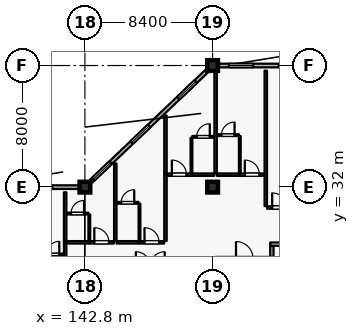
"""IFC4 building model, lengths in metres.
Left out: names, types, materials, properties, quantities, classifications, styles, units other than length and angle.
Written with IfcOpenShell. Run it as: python <this file> out.ifc"""

import sys

from ifc_helpers import new_model, si_unit, direction, frame, frame_2d, origin, origin_2d, place, context, subcontext, project, spatial, rectangle, extrude, element, fill, save


model = new_model("IFC4")
c1 = context("Model", 3, precision=1e-05, world=origin(), true_north=direction((0.0, 1.0)))
c2 = subcontext(c1, "Body", "Model", "MODEL_VIEW")
j1 = project(units=[si_unit("LENGTHUNIT", "METRE"), si_unit("PLANEANGLEUNIT", "RADIAN")], contexts=[c1])
p1 = place(None, origin())
s1 = spatial("IfcSite", under=j1, at=p1, CompositionType="ELEMENT")
p2 = place(p1, origin())
s2 = spatial("IfcBuilding", under=s1, at=p2, CompositionType="ELEMENT")
p3 = place(p2, frame((0.0, 0.0, 28.8)))
s3 = spatial("IfcBuildingStorey", under=s2, at=p3, CompositionType="ELEMENT", Elevation=28.8)
for number, where, z_axis, x_axis in (
    (1, (142.8, 32.0, 0.0), (0.0, 0.0, 1.0), (1.0, 0.0, 0.0)),
    (2, (151.2, 40.0, 0.0), (0.0, 0.0, 1.0), (1.0, 0.0, 0.0)),
    (3, (151.2, 32.0, 0.0), (0.0, 0.0, 1.0), (1.0, 0.0, 0.0)),
):
    element("IfcColumn", number, at=place(p3, frame(where, z_axis=z_axis, x_axis=x_axis)), inside=s3, PredefinedType="COLUMN", context=c2, shape_type="SweptSolid", body=[
        extrude(rectangle(XDim=0.7, YDim=0.7, at=origin_2d()), origin(), (0.0, 0.0, 1.0), 3.6),
    ])
p4 = place(p3, frame((134.75, 32.0, 0.0), z_axis=(0.0, 0.0, 1.0), x_axis=(1.0, 0.0, 0.0)))
e4 = element("IfcWall", 4, at=p4, inside=s3, PredefinedType="SOLIDWALL", context=c2, shape_type="SweptSolid", body=[
    extrude(rectangle(XDim=7.7, YDim=0.24, at=frame_2d((3.85, 0.0))), origin(), (0.0, 0.0, 1.0), 2.93),
])
p5 = place(p4, frame((1.0, 0.0, 0.8)))
e5 = element("IfcOpeningElement", 5, at=p5, cuts=e4, PredefinedType="OPENING", context=c2, shape_type="SweptSolid", body=[
    extrude(rectangle(XDim=1.6, YDim=1.6, at=frame_2d((0.8, 0.8))), frame((0.0, 0.13, 0.0), z_axis=(0.0, -1.0, 0.0), x_axis=(1.0, 0.0, 0.0)), (0.0, 0.0, 1.0), 0.26),
])
p6 = place(p4, frame((4.3, 0.0, 0.8)))
e6 = element("IfcOpeningElement", 6, at=p6, cuts=e4, PredefinedType="OPENING", context=c2, shape_type="SweptSolid", body=[
    extrude(rectangle(XDim=1.6, YDim=1.6, at=frame_2d((0.8, 0.8))), frame((0.0, 0.13, 0.0), z_axis=(0.0, -1.0, 0.0), x_axis=(1.0, 0.0, 0.0)), (0.0, 0.0, 1.0), 0.26),
])
p7 = place(p3, frame((143.15, 32.333, 0.0), z_axis=(0.0, 0.0, 1.0), x_axis=(0.724116091282, 0.689678103427, 0.0)))
e7 = element("IfcWall", 7, at=p7, inside=s3, PredefinedType="SOLIDWALL", context=c2, shape_type="SweptSolid", body=[
    extrude(rectangle(XDim=10.634, YDim=0.24, at=frame_2d((5.317, 0.0))), origin(), (0.0, 0.0, 1.0), 2.93),
])
p8 = place(p7, frame((0.27, 0.0, 0.8)))
e8 = element("IfcOpeningElement", 8, at=p8, cuts=e7, PredefinedType="OPENING", context=c2, shape_type="SweptSolid", body=[
    extrude(rectangle(XDim=1.6, YDim=1.6, at=frame_2d((0.8, 0.8))), frame((0.0, 0.13, 0.0), z_axis=(0.0, -1.0, 0.0), x_axis=(1.0, 0.0, 0.0)), (0.0, 0.0, 1.0), 0.26),
])
p9 = place(p7, frame((3.757, 0.0, 0.8)))
e9 = element("IfcOpeningElement", 9, at=p9, cuts=e7, PredefinedType="OPENING", context=c2, shape_type="SweptSolid", body=[
    extrude(rectangle(XDim=1.6, YDim=1.6, at=frame_2d((0.8, 0.8))), frame((0.0, 0.13, 0.0), z_axis=(0.0, -1.0, 0.0), x_axis=(1.0, 0.0, 0.0)), (0.0, 0.0, 1.0), 0.26),
])
p10 = place(p7, frame((8.004, 0.0, 0.8)))
e10 = element("IfcOpeningElement", 10, at=p10, cuts=e7, PredefinedType="OPENING", context=c2, shape_type="SweptSolid", body=[
    extrude(rectangle(XDim=1.6, YDim=1.6, at=frame_2d((0.8, 0.8))), frame((0.0, 0.13, 0.0), z_axis=(0.0, -1.0, 0.0), x_axis=(1.0, 0.0, 0.0)), (0.0, 0.0, 1.0), 0.26),
])
p11 = place(p3, frame((151.55, 40.0, 0.0), z_axis=(0.0, 0.0, 1.0), x_axis=(1.0, 0.0, 0.0)))
e11 = element("IfcWall", 11, at=p11, inside=s3, PredefinedType="SOLIDWALL", context=c2, shape_type="SweptSolid", body=[
    extrude(rectangle(XDim=7.7, YDim=0.24, at=frame_2d((3.85, 0.0))), origin(), (0.0, 0.0, 1.0), 2.93),
])
p12 = place(p11, frame((0.725, 0.0, 0.8)))
e12 = element("IfcOpeningElement", 12, at=p12, cuts=e11, PredefinedType="OPENING", context=c2, shape_type="SweptSolid", body=[
    extrude(rectangle(XDim=1.6, YDim=1.6, at=frame_2d((0.8, 0.8))), frame((0.0, 0.13, 0.0), z_axis=(0.0, -1.0, 0.0), x_axis=(1.0, 0.0, 0.0)), (0.0, 0.0, 1.0), 0.26),
])
p13 = place(p11, frame((4.0, 0.0, 0.8)))
e13 = element("IfcOpeningElement", 13, at=p13, cuts=e11, PredefinedType="OPENING", context=c2, shape_type="SweptSolid", body=[
    extrude(rectangle(XDim=1.6, YDim=1.6, at=frame_2d((0.8, 0.8))), frame((0.0, 0.13, 0.0), z_axis=(0.0, -1.0, 0.0), x_axis=(1.0, 0.0, 0.0)), (0.0, 0.0, 1.0), 0.26),
])
p14 = place(p3, frame((155.1, 27.415, 0.0), z_axis=(0.0, 0.0, 1.0), x_axis=(0.0, 1.0, 0.0)))
e14 = element("IfcWall", 14, at=p14, inside=s3, PredefinedType="PARTITIONING", context=c2, shape_type="SweptSolid", body=[
    extrude(rectangle(XDim=0.72, YDim=0.22, at=frame_2d((0.36, 0.0))), origin(), (0.0, 0.0, 1.0), 3.365),
])
p15 = place(p3, frame((154.99, 28.25, 0.0), z_axis=(0.0, 0.0, 1.0), x_axis=(1.0, 0.0, 0.0)))
e15 = element("IfcWall", 15, at=p15, inside=s3, PredefinedType="PARTITIONING", context=c2, shape_type="SweptSolid", body=[
    extrude(rectangle(XDim=4.02, YDim=0.22, at=frame_2d((2.01, 0.0))), origin(), (0.0, 0.0, 1.0), 3.365),
])
p16 = place(p15, frame((1.39, 0.0, 0.0)))
e16 = element("IfcOpeningElement", 16, at=p16, cuts=e15, PredefinedType="OPENING", context=c2, shape_type="SweptSolid", body=[
    extrude(rectangle(XDim=1.24, YDim=2.2, at=frame_2d((0.62, 1.1))), frame((0.0, 0.12, 0.0), z_axis=(0.0, -1.0, 0.0), x_axis=(1.0, 0.0, 0.0)), (0.0, 0.0, 1.0), 0.24),
])
p17 = place(p3, frame((139.97, 27.57, 0.0), z_axis=(0.0, 0.0, 1.0), x_axis=(1.0, 0.0, 0.0)))
e17 = element("IfcWall", 17, at=p17, inside=s3, PredefinedType="PARTITIONING", context=c2, shape_type="SweptSolid", body=[
    extrude(rectangle(XDim=1.43, YDim=0.115, at=frame_2d((0.715, 0.0))), origin(), (0.0, 0.0, 1.0), 3.365),
])
p18 = place(p17, frame((0.285, 0.0, 0.0)))
e18 = element("IfcOpeningElement", 18, at=p18, cuts=e17, PredefinedType="OPENING", context=c2, shape_type="SweptSolid", body=[
    extrude(rectangle(XDim=0.86, YDim=2.12, at=frame_2d((0.43, 1.06))), frame((0.0, 0.067, 0.0), z_axis=(0.0, -1.0, 0.0), x_axis=(1.0, 0.0, 0.0)), (0.0, 0.0, 1.0), 0.135),
])
p19 = place(p3, frame((141.5, 25.06, 0.0), z_axis=(0.0, 0.0, 1.0), x_axis=(0.0, 1.0, 0.0)))
e19 = element("IfcWall", 19, at=p19, inside=s3, PredefinedType="PARTITIONING", context=c2, shape_type="SweptSolid", body=[
    extrude(rectangle(XDim=3.39, YDim=0.16, at=frame_2d((1.695, 0.0))), origin(), (0.0, 0.0, 1.0), 3.365),
])
p20 = place(p3, frame((141.59, 28.37, 0.0), z_axis=(0.0, 0.0, 1.0), x_axis=(1.0, 0.0, 0.0)))
e20 = element("IfcWall", 20, at=p20, inside=s3, PredefinedType="PARTITIONING", context=c2, shape_type="SweptSolid", body=[
    extrude(rectangle(XDim=1.49, YDim=0.16, at=frame_2d((0.745, 0.0))), origin(), (0.0, 0.0, 1.0), 3.365),
])
p21 = place(p3, frame((143.09, 28.37, 0.0), z_axis=(0.0, 0.0, 1.0), x_axis=(1.0, 0.0, 0.0)))
e21 = element("IfcWall", 21, at=p21, inside=s3, PredefinedType="PARTITIONING", context=c2, shape_type="SweptSolid", body=[
    extrude(rectangle(XDim=1.62, YDim=0.16, at=frame_2d((0.81, 0.0))), origin(), (0.0, 0.0, 1.0), 3.365),
])
p22 = place(p21, frame((0.33, 0.0, 0.0)))
e22 = element("IfcOpeningElement", 22, at=p22, cuts=e21, PredefinedType="OPENING", context=c2, shape_type="SweptSolid", body=[
    extrude(rectangle(XDim=0.96, YDim=2.2, at=frame_2d((0.48, 1.1))), frame((0.0, 0.09, 0.0), z_axis=(0.0, -1.0, 0.0), x_axis=(1.0, 0.0, 0.0)), (0.0, 0.0, 1.0), 0.18),
])
p23 = place(p3, frame((143.09, 28.46, 0.0), z_axis=(0.0, 0.0, 1.0), x_axis=(0.0, 1.0, 0.0)))
e23 = element("IfcWall", 23, at=p23, inside=s3, PredefinedType="PARTITIONING", context=c2, shape_type="SweptSolid", body=[
    extrude(rectangle(XDim=1.74, YDim=0.115, at=frame_2d((0.87, 0.0))), origin(), (0.0, 0.0, 1.0), 3.365),
])
p24 = place(p3, frame((141.6, 30.26, 0.0), z_axis=(0.0, 0.0, 1.0), x_axis=(1.0, 0.0, 0.0)))
e24 = element("IfcWall", 24, at=p24, inside=s3, PredefinedType="PARTITIONING", context=c2, shape_type="SweptSolid", body=[
    extrude(rectangle(XDim=1.43, YDim=0.115, at=frame_2d((0.715, 0.0))), origin(), (0.0, 0.0, 1.0), 3.365),
])
p25 = place(p24, frame((0.285, 0.0, 0.0)))
e25 = element("IfcOpeningElement", 25, at=p25, cuts=e24, PredefinedType="OPENING", context=c2, shape_type="SweptSolid", body=[
    extrude(rectangle(XDim=0.86, YDim=2.12, at=frame_2d((0.43, 1.06))), frame((0.0, 0.067, 0.0), z_axis=(0.0, -1.0, 0.0), x_axis=(1.0, 0.0, 0.0)), (0.0, 0.0, 1.0), 0.135),
])
p26 = place(p3, frame((141.5, 28.46, 0.0), z_axis=(0.0, 0.0, 1.0), x_axis=(0.0, 1.0, 0.0)))
e26 = element("IfcWall", 26, at=p26, inside=s3, PredefinedType="PARTITIONING", context=c2, shape_type="SweptSolid", body=[
    extrude(rectangle(XDim=3.2, YDim=0.16, at=frame_2d((1.6, 0.0))), origin(), (0.0, 0.0, 1.0), 3.365),
])
p27 = place(p3, frame((144.89, 28.37, 0.0), z_axis=(0.0, 0.0, 1.0), x_axis=(1.0, 0.0, 0.0)))
e27 = element("IfcWall", 27, at=p27, inside=s3, PredefinedType="PARTITIONING", context=c2, shape_type="SweptSolid", body=[
    extrude(rectangle(XDim=1.49, YDim=0.16, at=frame_2d((0.745, 0.0))), origin(), (0.0, 0.0, 1.0), 3.365),
])
p28 = place(p3, frame((146.39, 28.37, 0.0), z_axis=(0.0, 0.0, 1.0), x_axis=(1.0, 0.0, 0.0)))
e28 = element("IfcWall", 28, at=p28, inside=s3, PredefinedType="PARTITIONING", context=c2, shape_type="SweptSolid", body=[
    extrude(rectangle(XDim=1.62, YDim=0.16, at=frame_2d((0.81, 0.0))), origin(), (0.0, 0.0, 1.0), 3.365),
])
p29 = place(p28, frame((0.33, 0.0, 0.0)))
e29 = element("IfcOpeningElement", 29, at=p29, cuts=e28, PredefinedType="OPENING", context=c2, shape_type="SweptSolid", body=[
    extrude(rectangle(XDim=0.96, YDim=2.2, at=frame_2d((0.48, 1.1))), frame((0.0, 0.09, 0.0), z_axis=(0.0, -1.0, 0.0), x_axis=(1.0, 0.0, 0.0)), (0.0, 0.0, 1.0), 0.18),
])
p30 = place(p3, frame((146.39, 28.46, 0.0), z_axis=(0.0, 0.0, 1.0), x_axis=(0.0, 1.0, 0.0)))
e30 = element("IfcWall", 30, at=p30, inside=s3, PredefinedType="PARTITIONING", context=c2, shape_type="SweptSolid", body=[
    extrude(rectangle(XDim=2.45, YDim=0.115, at=frame_2d((1.225, 0.0))), origin(), (0.0, 0.0, 1.0), 3.365),
])
p31 = place(p3, frame((144.9, 30.97, 0.0), z_axis=(0.0, 0.0, 1.0), x_axis=(1.0, 0.0, 0.0)))
e31 = element("IfcWall", 31, at=p31, inside=s3, PredefinedType="PARTITIONING", context=c2, shape_type="SweptSolid", body=[
    extrude(rectangle(XDim=1.43, YDim=0.115, at=frame_2d((0.715, 0.0))), origin(), (0.0, 0.0, 1.0), 3.365),
])
p32 = place(p31, frame((0.285, 0.0, 0.0)))
e32 = element("IfcOpeningElement", 32, at=p32, cuts=e31, PredefinedType="OPENING", context=c2, shape_type="SweptSolid", body=[
    extrude(rectangle(XDim=0.86, YDim=2.12, at=frame_2d((0.43, 1.06))), frame((0.0, 0.067, 0.0), z_axis=(0.0, -1.0, 0.0), x_axis=(1.0, 0.0, 0.0)), (0.0, 0.0, 1.0), 0.135),
])
p33 = place(p3, frame((144.8, 28.46, 0.0), z_axis=(0.0, 0.0, 1.0), x_axis=(0.0, 1.0, 0.0)))
e33 = element("IfcWall", 33, at=p33, inside=s3, PredefinedType="PARTITIONING", context=c2, shape_type="SweptSolid", body=[
    extrude(rectangle(XDim=5.1, YDim=0.16, at=frame_2d((2.55, 0.0))), origin(), (0.0, 0.0, 1.0), 3.365),
])
p34 = place(p3, frame((148.1, 28.46, 0.0), z_axis=(0.0, 0.0, 1.0), x_axis=(0.0, 1.0, 0.0)))
e34 = element("IfcWall", 34, at=p34, inside=s3, PredefinedType="PARTITIONING", context=c2, shape_type="SweptSolid", body=[
    extrude(rectangle(XDim=4.44, YDim=0.16, at=frame_2d((2.22, 0.0))), origin(), (0.0, 0.0, 1.0), 3.365),
])
p35 = place(p3, frame((148.19, 32.82, 0.0), z_axis=(0.0, 0.0, 1.0), x_axis=(1.0, 0.0, 0.0)))
e35 = element("IfcWall", 35, at=p35, inside=s3, PredefinedType="PARTITIONING", context=c2, shape_type="SweptSolid", body=[
    extrude(rectangle(XDim=1.62, YDim=0.16, at=frame_2d((0.81, 0.0))), origin(), (0.0, 0.0, 1.0), 3.365),
])
p36 = place(p35, frame((0.33, 0.0, 0.0)))
e36 = element("IfcOpeningElement", 36, at=p36, cuts=e35, PredefinedType="OPENING", context=c2, shape_type="SweptSolid", body=[
    extrude(rectangle(XDim=0.96, YDim=2.2, at=frame_2d((0.48, 1.1))), frame((0.0, 0.09, 0.0), z_axis=(0.0, -1.0, 0.0), x_axis=(1.0, 0.0, 0.0)), (0.0, 0.0, 1.0), 0.18),
])
p37 = place(p3, frame((149.82, 32.82, 0.0), z_axis=(0.0, 0.0, 1.0), x_axis=(1.0, 0.0, 0.0)))
e37 = element("IfcWall", 37, at=p37, inside=s3, PredefinedType="PARTITIONING", context=c2, shape_type="SweptSolid", body=[
    extrude(rectangle(XDim=1.49, YDim=0.16, at=frame_2d((0.745, 0.0))), origin(), (0.0, 0.0, 1.0), 3.365),
])
p38 = place(p3, frame((149.81, 32.91, 0.0), z_axis=(0.0, 0.0, 1.0), x_axis=(0.0, 1.0, 0.0)))
e38 = element("IfcWall", 38, at=p38, inside=s3, PredefinedType="PARTITIONING", context=c2, shape_type="SweptSolid", body=[
    extrude(rectangle(XDim=2.34, YDim=0.115, at=frame_2d((1.17, 0.0))), origin(), (0.0, 0.0, 1.0), 3.365),
])
p39 = place(p3, frame((149.87, 35.31, 0.0), z_axis=(0.0, 0.0, 1.0), x_axis=(1.0, 0.0, 0.0)))
e39 = element("IfcWall", 39, at=p39, inside=s3, PredefinedType="PARTITIONING", context=c2, shape_type="SweptSolid", body=[
    extrude(rectangle(XDim=1.43, YDim=0.115, at=frame_2d((0.715, 0.0))), origin(), (0.0, 0.0, 1.0), 3.365),
])
p40 = place(p39, frame((0.285, 0.0, 0.0)))
e40 = element("IfcOpeningElement", 40, at=p40, cuts=e39, PredefinedType="OPENING", context=c2, shape_type="SweptSolid", body=[
    extrude(rectangle(XDim=0.86, YDim=2.12, at=frame_2d((0.43, 1.06))), frame((0.0, 0.067, 0.0), z_axis=(0.0, -1.0, 0.0), x_axis=(1.0, 0.0, 0.0)), (0.0, 0.0, 1.0), 0.135),
])
p41 = place(p3, frame((148.1, 32.91, 0.0), z_axis=(0.0, 0.0, 1.0), x_axis=(0.0, 1.0, 0.0)))
e41 = element("IfcWall", 41, at=p41, inside=s3, PredefinedType="PARTITIONING", context=c2, shape_type="SweptSolid", body=[
    extrude(rectangle(XDim=3.8, YDim=0.16, at=frame_2d((1.9, 0.0))), origin(), (0.0, 0.0, 1.0), 3.365),
])
p42 = place(p3, frame((151.49, 32.82, 0.0), z_axis=(0.0, 0.0, 1.0), x_axis=(1.0, 0.0, 0.0)))
e42 = element("IfcWall", 42, at=p42, inside=s3, PredefinedType="PARTITIONING", context=c2, shape_type="SweptSolid", body=[
    extrude(rectangle(XDim=1.49, YDim=0.16, at=frame_2d((0.745, 0.0))), origin(), (0.0, 0.0, 1.0), 3.365),
])
p43 = place(p3, frame((152.99, 32.82, 0.0), z_axis=(0.0, 0.0, 1.0), x_axis=(1.0, 0.0, 0.0)))
e43 = element("IfcWall", 43, at=p43, inside=s3, PredefinedType="PARTITIONING", context=c2, shape_type="SweptSolid", body=[
    extrude(rectangle(XDim=1.62, YDim=0.16, at=frame_2d((0.81, 0.0))), origin(), (0.0, 0.0, 1.0), 3.365),
])
p44 = place(p43, frame((0.33, 0.0, 0.0)))
e44 = element("IfcOpeningElement", 44, at=p44, cuts=e43, PredefinedType="OPENING", context=c2, shape_type="SweptSolid", body=[
    extrude(rectangle(XDim=0.96, YDim=2.2, at=frame_2d((0.48, 1.1))), frame((0.0, 0.09, 0.0), z_axis=(0.0, -1.0, 0.0), x_axis=(1.0, 0.0, 0.0)), (0.0, 0.0, 1.0), 0.18),
])
p45 = place(p3, frame((152.99, 32.91, 0.0), z_axis=(0.0, 0.0, 1.0), x_axis=(0.0, 1.0, 0.0)))
e45 = element("IfcWall", 45, at=p45, inside=s3, PredefinedType="PARTITIONING", context=c2, shape_type="SweptSolid", body=[
    extrude(rectangle(XDim=2.45, YDim=0.115, at=frame_2d((1.225, 0.0))), origin(), (0.0, 0.0, 1.0), 3.365),
])
p46 = place(p3, frame((151.5, 35.42, 0.0), z_axis=(0.0, 0.0, 1.0), x_axis=(1.0, 0.0, 0.0)))
e46 = element("IfcWall", 46, at=p46, inside=s3, PredefinedType="PARTITIONING", context=c2, shape_type="SweptSolid", body=[
    extrude(rectangle(XDim=1.43, YDim=0.115, at=frame_2d((0.715, 0.0))), origin(), (0.0, 0.0, 1.0), 3.365),
])
p47 = place(p46, frame((0.285, 0.0, 0.0)))
e47 = element("IfcOpeningElement", 47, at=p47, cuts=e46, PredefinedType="OPENING", context=c2, shape_type="SweptSolid", body=[
    extrude(rectangle(XDim=0.86, YDim=2.12, at=frame_2d((0.43, 1.06))), frame((0.0, 0.067, 0.0), z_axis=(0.0, -1.0, 0.0), x_axis=(1.0, 0.0, 0.0)), (0.0, 0.0, 1.0), 0.135),
])
p48 = place(p3, frame((151.4, 32.91, 0.0), z_axis=(0.0, 0.0, 1.0), x_axis=(0.0, 1.0, 0.0)))
e48 = element("IfcWall", 48, at=p48, inside=s3, PredefinedType="PARTITIONING", context=c2, shape_type="SweptSolid", body=[
    extrude(rectangle(XDim=6.75, YDim=0.16, at=frame_2d((3.375, 0.0))), origin(), (0.0, 0.0, 1.0), 2.73),
])
p49 = place(p3, frame((154.79, 30.66, 0.0), z_axis=(0.0, 0.0, 1.0), x_axis=(1.0, 0.0, 0.0)))
e49 = element("IfcWall", 49, at=p49, inside=s3, PredefinedType="PARTITIONING", context=c2, shape_type="SweptSolid", body=[
    extrude(rectangle(XDim=1.62, YDim=0.16, at=frame_2d((0.81, 0.0))), origin(), (0.0, 0.0, 1.0), 3.365),
])
p50 = place(p49, frame((0.33, 0.0, 0.0)))
e50 = element("IfcOpeningElement", 50, at=p50, cuts=e49, PredefinedType="OPENING", context=c2, shape_type="SweptSolid", body=[
    extrude(rectangle(XDim=0.96, YDim=2.2, at=frame_2d((0.48, 1.1))), frame((0.0, 0.09, 0.0), z_axis=(0.0, -1.0, 0.0), x_axis=(1.0, 0.0, 0.0)), (0.0, 0.0, 1.0), 0.18),
])
p51 = place(p3, frame((154.7, 30.75, 0.0), z_axis=(0.0, 0.0, 1.0), x_axis=(0.0, 1.0, 0.0)))
e51 = element("IfcWall", 51, at=p51, inside=s3, PredefinedType="PARTITIONING", context=c2, shape_type="SweptSolid", body=[
    extrude(rectangle(XDim=8.91, YDim=0.16, at=frame_2d((4.455, 0.0))), origin(), (0.0, 0.0, 1.0), 3.365),
])
p52 = place(p6, origin())
e52 = element("IfcWindow", 52, at=p52, inside=s3, PartitioningType="SINGLE_PANEL", PredefinedType="WINDOW", context=c2, shape_type="SweptSolid", body=[
    extrude(rectangle(XDim=1.6, YDim=1.6, at=frame_2d((0.8, 0.8))), frame((0.0, 0.03, 0.0), z_axis=(0.0, -1.0, 0.0), x_axis=(1.0, 0.0, 0.0)), (0.0, 0.0, 1.0), 0.06),
])
fill(e6, e52)
p53 = place(p8, origin())
e53 = element("IfcWindow", 53, at=p53, inside=s3, PartitioningType="SINGLE_PANEL", PredefinedType="WINDOW", context=c2, shape_type="SweptSolid", body=[
    extrude(rectangle(XDim=1.6, YDim=1.6, at=frame_2d((0.8, 0.8))), frame((0.0, 0.03, 0.0), z_axis=(0.0, -1.0, 0.0), x_axis=(1.0, 0.0, 0.0)), (0.0, 0.0, 1.0), 0.06),
])
fill(e8, e53)
p54 = place(p9, origin())
e54 = element("IfcWindow", 54, at=p54, inside=s3, PartitioningType="SINGLE_PANEL", PredefinedType="WINDOW", context=c2, shape_type="SweptSolid", body=[
    extrude(rectangle(XDim=1.6, YDim=1.6, at=frame_2d((0.8, 0.8))), frame((0.0, 0.03, 0.0), z_axis=(0.0, -1.0, 0.0), x_axis=(1.0, 0.0, 0.0)), (0.0, 0.0, 1.0), 0.06),
])
fill(e9, e54)
p55 = place(p10, origin())
e55 = element("IfcWindow", 55, at=p55, inside=s3, PartitioningType="SINGLE_PANEL", PredefinedType="WINDOW", context=c2, shape_type="SweptSolid", body=[
    extrude(rectangle(XDim=1.6, YDim=1.6, at=frame_2d((0.8, 0.8))), frame((0.0, 0.03, 0.0), z_axis=(0.0, -1.0, 0.0), x_axis=(1.0, 0.0, 0.0)), (0.0, 0.0, 1.0), 0.06),
])
fill(e10, e55)
p56 = place(p12, origin())
e56 = element("IfcWindow", 56, at=p56, inside=s3, PartitioningType="SINGLE_PANEL", PredefinedType="WINDOW", context=c2, shape_type="SweptSolid", body=[
    extrude(rectangle(XDim=1.6, YDim=1.6, at=frame_2d((0.8, 0.8))), frame((0.0, 0.03, 0.0), z_axis=(0.0, -1.0, 0.0), x_axis=(1.0, 0.0, 0.0)), (0.0, 0.0, 1.0), 0.06),
])
fill(e12, e56)
p57 = place(p13, origin())
e57 = element("IfcWindow", 57, at=p57, inside=s3, PartitioningType="SINGLE_PANEL", PredefinedType="WINDOW", context=c2, shape_type="SweptSolid", body=[
    extrude(rectangle(XDim=1.6, YDim=1.6, at=frame_2d((0.8, 0.8))), frame((0.0, 0.03, 0.0), z_axis=(0.0, -1.0, 0.0), x_axis=(1.0, 0.0, 0.0)), (0.0, 0.0, 1.0), 0.06),
])
fill(e13, e57)
p58 = place(p18, origin())
e58 = element("IfcDoor", 58, at=p58, inside=s3, OperationType="SINGLE_SWING_RIGHT", PredefinedType="DOOR", context=c2, shape_type="SweptSolid", body=[
    extrude(rectangle(XDim=0.86, YDim=2.12, at=frame_2d((0.43, 1.06))), frame((0.0, 0.025, 0.0), z_axis=(0.0, -1.0, 0.0), x_axis=(1.0, 0.0, 0.0)), (0.0, 0.0, 1.0), 0.05),
])
fill(e18, e58)
p59 = place(p22, origin())
e59 = element("IfcDoor", 59, at=p59, inside=s3, OperationType="SINGLE_SWING_LEFT", PredefinedType="DOOR", context=c2, shape_type="SweptSolid", body=[
    extrude(rectangle(XDim=0.96, YDim=2.2, at=frame_2d((0.48, 1.1))), frame((0.0, 0.025, 0.0), z_axis=(0.0, -1.0, 0.0), x_axis=(1.0, 0.0, 0.0)), (0.0, 0.0, 1.0), 0.05),
])
fill(e22, e59)
p60 = place(p25, origin())
e60 = element("IfcDoor", 60, at=p60, inside=s3, OperationType="SINGLE_SWING_RIGHT", PredefinedType="DOOR", context=c2, shape_type="SweptSolid", body=[
    extrude(rectangle(XDim=0.86, YDim=2.12, at=frame_2d((0.43, 1.06))), frame((0.0, 0.025, 0.0), z_axis=(0.0, -1.0, 0.0), x_axis=(1.0, 0.0, 0.0)), (0.0, 0.0, 1.0), 0.05),
])
fill(e25, e60)
p61 = place(p29, origin())
e61 = element("IfcDoor", 61, at=p61, inside=s3, OperationType="SINGLE_SWING_LEFT", PredefinedType="DOOR", context=c2, shape_type="SweptSolid", body=[
    extrude(rectangle(XDim=0.96, YDim=2.2, at=frame_2d((0.48, 1.1))), frame((0.0, 0.025, 0.0), z_axis=(0.0, -1.0, 0.0), x_axis=(1.0, 0.0, 0.0)), (0.0, 0.0, 1.0), 0.05),
])
fill(e29, e61)
p62 = place(p32, origin())
e62 = element("IfcDoor", 62, at=p62, inside=s3, OperationType="SINGLE_SWING_RIGHT", PredefinedType="DOOR", context=c2, shape_type="SweptSolid", body=[
    extrude(rectangle(XDim=0.86, YDim=2.12, at=frame_2d((0.43, 1.06))), frame((0.0, 0.025, 0.0), z_axis=(0.0, -1.0, 0.0), x_axis=(1.0, 0.0, 0.0)), (0.0, 0.0, 1.0), 0.05),
])
fill(e32, e62)
p63 = place(p36, origin())
e63 = element("IfcDoor", 63, at=p63, inside=s3, OperationType="SINGLE_SWING_LEFT", PredefinedType="DOOR", context=c2, shape_type="SweptSolid", body=[
    extrude(rectangle(XDim=0.96, YDim=2.2, at=frame_2d((0.48, 1.1))), frame((0.0, 0.025, 0.0), z_axis=(0.0, -1.0, 0.0), x_axis=(1.0, 0.0, 0.0)), (0.0, 0.0, 1.0), 0.05),
])
fill(e36, e63)
p64 = place(p40, origin())
e64 = element("IfcDoor", 64, at=p64, inside=s3, OperationType="SINGLE_SWING_RIGHT", PredefinedType="DOOR", context=c2, shape_type="SweptSolid", body=[
    extrude(rectangle(XDim=0.86, YDim=2.12, at=frame_2d((0.43, 1.06))), frame((0.0, 0.025, 0.0), z_axis=(0.0, -1.0, 0.0), x_axis=(1.0, 0.0, 0.0)), (0.0, 0.0, 1.0), 0.05),
])
fill(e40, e64)
p65 = place(p44, origin())
e65 = element("IfcDoor", 65, at=p65, inside=s3, OperationType="SINGLE_SWING_LEFT", PredefinedType="DOOR", context=c2, shape_type="SweptSolid", body=[
    extrude(rectangle(XDim=0.96, YDim=2.2, at=frame_2d((0.48, 1.1))), frame((0.0, 0.025, 0.0), z_axis=(0.0, -1.0, 0.0), x_axis=(1.0, 0.0, 0.0)), (0.0, 0.0, 1.0), 0.05),
])
fill(e44, e65)
p66 = place(p47, origin())
e66 = element("IfcDoor", 66, at=p66, inside=s3, OperationType="SINGLE_SWING_RIGHT", PredefinedType="DOOR", context=c2, shape_type="SweptSolid", body=[
    extrude(rectangle(XDim=0.86, YDim=2.12, at=frame_2d((0.43, 1.06))), frame((0.0, 0.025, 0.0), z_axis=(0.0, -1.0, 0.0), x_axis=(1.0, 0.0, 0.0)), (0.0, 0.0, 1.0), 0.05),
])
fill(e47, e66)
p67 = place(p50, origin())
e67 = element("IfcDoor", 67, at=p67, inside=s3, OperationType="SINGLE_SWING_LEFT", PredefinedType="DOOR", context=c2, shape_type="SweptSolid", body=[
    extrude(rectangle(XDim=0.96, YDim=2.2, at=frame_2d((0.48, 1.1))), frame((0.0, 0.025, 0.0), z_axis=(0.0, -1.0, 0.0), x_axis=(1.0, 0.0, 0.0)), (0.0, 0.0, 1.0), 0.05),
])
fill(e50, e67)
save(model, sys.argv[1])
